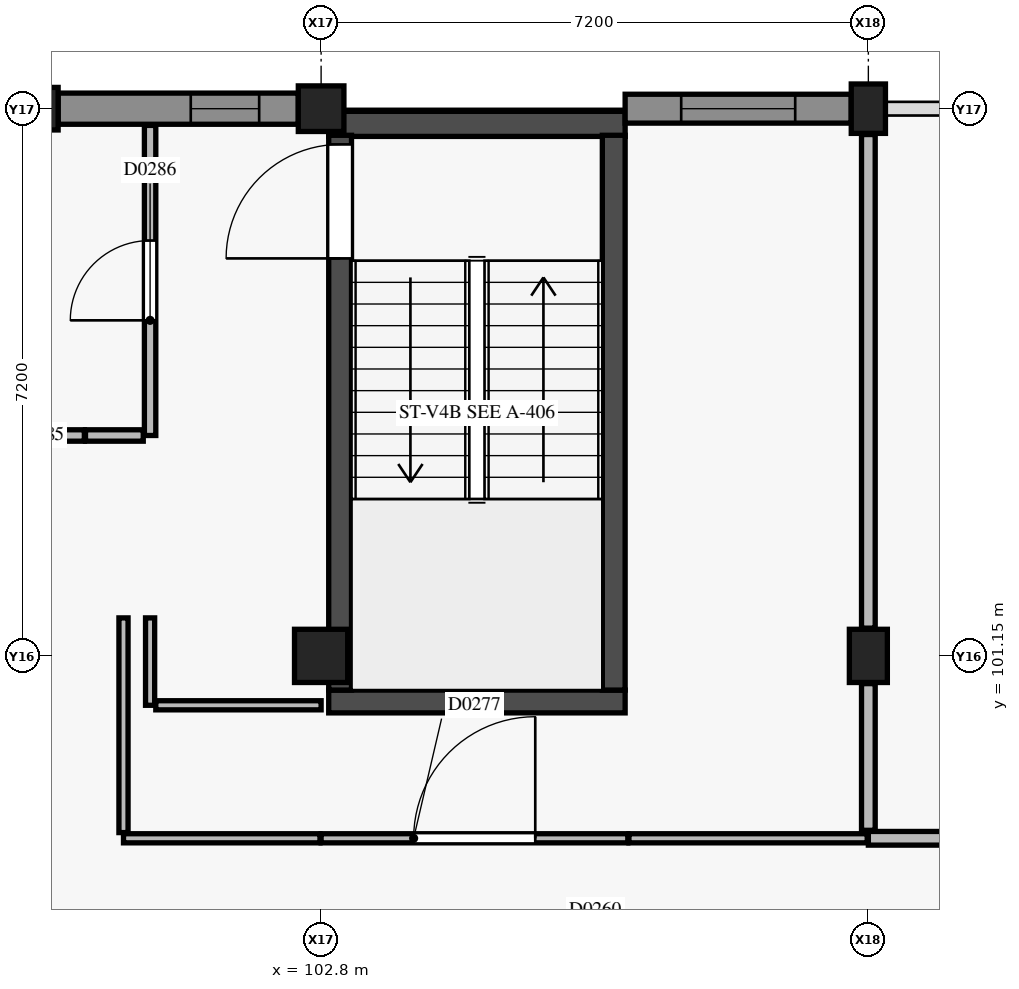
"""IFC4 building model, lengths in metres.
Left out: names, types, materials, properties, quantities, classifications, styles, units other than length and angle.
Written with IfcOpenShell. Run it as: python <this file> out.ifc"""

import sys

from ifc_helpers import new_model, si_unit, direction, frame, frame_2d, origin, origin_2d, place, context, subcontext, project, spatial, rectangle, circle, extrude, element, fill, save


model = new_model("IFC4")
c1 = context("Model", 3, precision=1e-05, world=origin(), true_north=direction((0.0, 1.0)))
c2 = subcontext(c1, "Body", "Model", "MODEL_VIEW")
j1 = project(units=[si_unit("LENGTHUNIT", "METRE"), si_unit("PLANEANGLEUNIT", "RADIAN")], contexts=[c1])
p1 = place(None, origin())
s1 = spatial("IfcSite", under=j1, at=p1, CompositionType="ELEMENT")
p2 = place(p1, origin())
s2 = spatial("IfcBuilding", under=s1, at=p2, CompositionType="ELEMENT")
p3 = place(p2, frame((0.0, 0.0, 13.2)))
s3 = spatial("IfcBuildingStorey", under=s2, at=p3, CompositionType="ELEMENT", Elevation=13.2)
p4 = place(p3, frame((102.8, 101.15, 0.0), z_axis=(0.0, 0.0, 1.0), x_axis=(1.0, 0.0, 0.0)))
e1 = element("IfcColumn", 1, at=p4, inside=s3, PredefinedType="COLUMN", context=c2, shape_type="SweptSolid", body=[
    extrude(rectangle(XDim=0.7, YDim=0.7, at=origin_2d()), origin(), (0.0, 0.0, 1.0), 4.2),
])
p5 = place(p3, frame((102.8, 108.35, 0.0), z_axis=(0.0, 0.0, 1.0), x_axis=(1.0, 0.0, 0.0)))
e2 = element("IfcColumn", 2, at=p5, inside=s3, PredefinedType="COLUMN", context=c2, shape_type="SweptSolid", body=[
    extrude(circle(Radius=0.3, at=origin_2d()), origin(), (0.0, 0.0, 1.0), 4.2),
])
p6 = place(p3, frame((110.0, 101.15, 0.0), z_axis=(0.0, 0.0, 1.0), x_axis=(1.0, 0.0, 0.0)))
e3 = element("IfcColumn", 3, at=p6, inside=s3, PredefinedType="COLUMN", context=c2, shape_type="SweptSolid", body=[
    extrude(rectangle(XDim=0.5, YDim=0.7, at=origin_2d()), origin(), (0.0, 0.0, 1.0), 4.2),
])
p7 = place(p3, frame((110.0, 108.35, 0.0), z_axis=(0.0, 0.0, 1.0), x_axis=(1.0, 0.0, 0.0)))
e4 = element("IfcColumn", 4, at=p7, inside=s3, PredefinedType="COLUMN", context=c2, shape_type="SweptSolid", body=[
    extrude(rectangle(XDim=0.45, YDim=0.65, at=origin_2d()), origin(), (0.0, 0.0, 1.0), 4.2),
])
p8 = place(p3, frame((99.2, 108.35, 0.0), z_axis=(0.0, 0.0, 1.0), x_axis=(1.0, 0.0, 0.0)))
e5 = element("IfcColumn", 5, at=p8, inside=s3, PredefinedType="PILASTER", context=c2, shape_type="SweptSolid", body=[
    extrude(rectangle(XDim=0.28, YDim=0.56, at=origin_2d()), origin(), (0.0, 0.0, 1.0), 4.2),
])
p9 = place(p3, frame((102.9, 100.55, 0.0), z_axis=(0.0, 0.0, 1.0), x_axis=(1.0, 0.0, 0.0)))
e6 = element("IfcWall", 6, at=p9, inside=s3, PredefinedType="SHEAR", context=c2, shape_type="SweptSolid", body=[
    extrude(rectangle(XDim=3.9, YDim=0.3, at=frame_2d((1.95, 0.0))), origin(), (0.0, 0.0, 1.0), 3.95),
])
p10 = place(p3, frame((102.9, 108.15, 0.0), z_axis=(0.0, 0.0, 1.0), x_axis=(1.0, 0.0, 0.0)))
e7 = element("IfcWall", 7, at=p10, inside=s3, PredefinedType="SHEAR", context=c2, shape_type="SweptSolid", body=[
    extrude(rectangle(XDim=3.9, YDim=0.33, at=frame_2d((1.95, 0.0))), origin(), (0.0, 0.0, 1.0), 3.95),
])
p11 = place(p3, frame((103.05, 100.7, 0.0), z_axis=(0.0, 0.0, 1.0), x_axis=(0.0, 1.0, 0.0)))
e8 = element("IfcWall", 8, at=p11, inside=s3, PredefinedType="SHEAR", context=c2, shape_type="SweptSolid", body=[
    extrude(rectangle(XDim=7.3, YDim=0.3, at=frame_2d((3.65, 0.0))), origin(), (0.0, 0.0, 1.0), 3.95),
])
p12 = place(p11, frame((5.68, 0.0, 0.0)))
e9 = element("IfcOpeningElement", 9, at=p12, cuts=e8, PredefinedType="OPENING", context=c2, shape_type="SweptSolid", body=[
    extrude(rectangle(XDim=1.5, YDim=2.15, at=frame_2d((0.75, 1.075))), frame((0.0, 0.16, 0.0), z_axis=(0.0, -1.0, 0.0), x_axis=(1.0, 0.0, 0.0)), (0.0, 0.0, 1.0), 0.32),
])
p13 = place(p3, frame((106.65, 100.7, 0.0), z_axis=(0.0, 0.0, 1.0), x_axis=(0.0, 1.0, 0.0)))
e10 = element("IfcWall", 10, at=p13, inside=s3, PredefinedType="SHEAR", context=c2, shape_type="SweptSolid", body=[
    extrude(rectangle(XDim=7.3, YDim=0.3, at=frame_2d((3.65, 0.0))), origin(), (0.0, 0.0, 1.0), 3.95),
])
p14 = place(p3, frame((99.34, 108.35, 0.0), z_axis=(0.0, 0.0, 1.0), x_axis=(1.0, 0.0, 0.0)))
e11 = element("IfcWall", 11, at=p14, inside=s3, PredefinedType="USERDEFINED", context=c2, shape_type="SweptSolid", body=[
    extrude(rectangle(XDim=3.16, YDim=0.41, at=frame_2d((1.58, 0.0))), origin(), (0.0, 0.0, 1.0), 3.13),
])
p15 = place(p14, frame((1.745, 0.0, 0.95)))
e12 = element("IfcOpeningElement", 12, at=p15, cuts=e11, PredefinedType="OPENING", context=c2, shape_type="SweptSolid", body=[
    extrude(rectangle(XDim=0.9, YDim=1.2, at=frame_2d((0.45, 0.6))), frame((0.0, 0.215, 0.0), z_axis=(0.0, -1.0, 0.0), x_axis=(1.0, 0.0, 0.0)), (0.0, 0.0, 1.0), 0.43),
])
p16 = place(p3, frame((106.8, 108.35, 0.0), z_axis=(0.0, 0.0, 1.0), x_axis=(1.0, 0.0, 0.0)))
e13 = element("IfcWall", 13, at=p16, inside=s3, PredefinedType="USERDEFINED", context=c2, shape_type="SweptSolid", body=[
    extrude(rectangle(XDim=2.975, YDim=0.38, at=frame_2d((1.487, 0.0))), origin(), (0.0, 0.0, 1.0), 3.13),
])
p17 = place(p16, frame((0.738, 0.0, 0.9)))
e14 = element("IfcOpeningElement", 14, at=p17, cuts=e13, PredefinedType="OPENING", context=c2, shape_type="SweptSolid", body=[
    extrude(rectangle(XDim=1.5, YDim=1.5, at=frame_2d((0.75, 0.75))), frame((0.0, 0.2, 0.0), z_axis=(0.0, -1.0, 0.0), x_axis=(1.0, 0.0, 0.0)), (0.0, 0.0, 1.0), 0.4),
])
p18 = place(p3, frame((110.0, 98.75, 0.0), z_axis=(0.0, 0.0, 1.0), x_axis=(1.0, 0.0, 0.0)))
e15 = element("IfcWall", 15, at=p18, inside=s3, PredefinedType="PLUMBINGWALL", context=c2, shape_type="SweptSolid", body=[
    extrude(rectangle(XDim=2.4, YDim=0.18, at=frame_2d((1.2, 0.0))), origin(), (0.0, 0.0, 1.0), 3.355),
])
p19 = place(p3, frame((100.55, 104.05, 0.0), z_axis=(0.0, 0.0, 1.0), x_axis=(0.0, 1.0, 0.0)))
e16 = element("IfcWall", 16, at=p19, inside=s3, PredefinedType="PARTITIONING", context=c2, shape_type="SweptSolid", body=[
    extrude(rectangle(XDim=4.08, YDim=0.15, at=frame_2d((2.04, 0.0))), origin(), (0.0, 0.0, 1.0), 3.515),
])
p20 = place(p19, frame((1.515, 0.0, 0.0)))
e17 = element("IfcOpeningElement", 17, at=p20, cuts=e16, PredefinedType="OPENING", context=c2, shape_type="SweptSolid", body=[
    extrude(rectangle(XDim=1.05, YDim=2.15, at=frame_2d((0.525, 1.075))), frame((0.0, 0.085, 0.0), z_axis=(0.0, -1.0, 0.0), x_axis=(1.0, 0.0, 0.0)), (0.0, 0.0, 1.0), 0.17),
])
p21 = place(p3, frame((99.7, 104.05, 0.0), z_axis=(0.0, 0.0, 1.0), x_axis=(1.0, 0.0, 0.0)))
e18 = element("IfcWall", 18, at=p21, inside=s3, PredefinedType="PARTITIONING", context=c2, shape_type="SweptSolid", body=[
    extrude(rectangle(XDim=0.76, YDim=0.15, at=frame_2d((0.38, 0.0))), origin(), (0.0, 0.0, 1.0), 3.95),
])
p22 = place(p3, frame((98.715, 104.05, 0.0), z_axis=(0.0, 0.0, 1.0), x_axis=(1.0, 0.0, 0.0)))
e19 = element("IfcWall", 19, at=p22, inside=s3, PredefinedType="PARTITIONING", context=c2, shape_type="SweptSolid", body=[
    extrude(rectangle(XDim=0.97, YDim=0.15, at=frame_2d((0.485, 0.0))), origin(), (0.0, 0.0, 1.0), 3.95),
])
p23 = place(p3, frame((100.55, 100.5, 0.0), z_axis=(0.0, 0.0, 1.0), x_axis=(0.0, 1.0, 0.0)))
e20 = element("IfcWall", 20, at=p23, inside=s3, PredefinedType="PARTITIONING", context=c2, shape_type="SweptSolid", body=[
    extrude(rectangle(XDim=1.15, YDim=0.12, at=frame_2d((0.575, 0.0))), origin(), (0.0, 0.0, 1.0), 3.355),
])
p24 = place(p3, frame((100.625, 100.5, 0.0), z_axis=(0.0, 0.0, 1.0), x_axis=(1.0, 0.0, 0.0)))
e21 = element("IfcWall", 21, at=p24, inside=s3, PredefinedType="PARTITIONING", context=c2, shape_type="SweptSolid", body=[
    extrude(rectangle(XDim=2.175, YDim=0.12, at=frame_2d((1.087, 0.0))), origin(), (0.0, 0.0, 1.0), 3.355),
])
p25 = place(p3, frame((106.85, 98.75, 0.0), z_axis=(0.0, 0.0, 1.0), x_axis=(1.0, 0.0, 0.0)))
e22 = element("IfcWall", 22, at=p25, inside=s3, PredefinedType="PARTITIONING", context=c2, shape_type="SweptSolid", body=[
    extrude(rectangle(XDim=3.135, YDim=0.12, at=frame_2d((1.567, 0.0))), origin(), (0.0, 0.0, 1.0), 3.355),
])
p26 = place(p3, frame((102.8, 98.75, 0.0), z_axis=(0.0, 0.0, 1.0), x_axis=(1.0, 0.0, 0.0)))
e23 = element("IfcWall", 23, at=p26, inside=s3, PredefinedType="PARTITIONING", context=c2, shape_type="SweptSolid", body=[
    extrude(rectangle(XDim=4.035, YDim=0.12, at=frame_2d((2.018, 0.0))), origin(), (0.0, 0.0, 1.0), 3.355),
])
p27 = place(p26, frame((1.218, 0.0, 0.0)))
e24 = element("IfcOpeningElement", 24, at=p27, cuts=e23, PredefinedType="OPENING", context=c2, shape_type="SweptSolid", body=[
    extrude(rectangle(XDim=1.6, YDim=2.25, at=frame_2d((0.8, 1.125))), frame((0.0, 0.07, 0.0), z_axis=(0.0, -1.0, 0.0), x_axis=(1.0, 0.0, 0.0)), (0.0, 0.0, 1.0), 0.14),
])
p28 = place(p3, frame((100.2, 98.75, 0.0), z_axis=(0.0, 0.0, 1.0), x_axis=(1.0, 0.0, 0.0)))
e25 = element("IfcWall", 25, at=p28, inside=s3, PredefinedType="PARTITIONING", context=c2, shape_type="SweptSolid", body=[
    extrude(rectangle(XDim=2.585, YDim=0.12, at=frame_2d((1.292, 0.0))), origin(), (0.0, 0.0, 1.0), 3.355),
])
p29 = place(p3, frame((100.2, 98.825, 0.0), z_axis=(0.0, 0.0, 1.0), x_axis=(0.0, 1.0, 0.0)))
e26 = element("IfcWall", 26, at=p29, inside=s3, PredefinedType="PARTITIONING", context=c2, shape_type="SweptSolid", body=[
    extrude(rectangle(XDim=2.825, YDim=0.12, at=frame_2d((1.413, 0.0))), origin(), (0.0, 0.0, 1.0), 3.355),
])
p30 = place(p3, frame((110.0, 98.855, 0.0), z_axis=(0.0, 0.0, 1.0), x_axis=(0.0, 1.0, 0.0)))
e27 = element("IfcWall", 27, at=p30, inside=s3, PredefinedType="PLUMBINGWALL", context=c2, shape_type="SweptSolid", body=[
    extrude(rectangle(XDim=1.93, YDim=0.18, at=frame_2d((0.965, 0.0))), origin(), (0.0, 0.0, 1.0), 3.355),
])
p31 = place(p3, frame((110.0, 101.515, 0.0), z_axis=(0.0, 0.0, 1.0), x_axis=(0.0, 1.0, 0.0)))
e28 = element("IfcWall", 28, at=p31, inside=s3, PredefinedType="PLUMBINGWALL", context=c2, shape_type="SweptSolid", body=[
    extrude(rectangle(XDim=6.495, YDim=0.18, at=frame_2d((3.248, 0.0))), origin(), (0.0, 0.0, 1.0), 3.385),
])
p32 = place(p15, origin())
e29 = element("IfcWindow", 29, at=p32, inside=s3, PartitioningType="SINGLE_PANEL", PredefinedType="WINDOW", context=c2, shape_type="SweptSolid", body=[
    extrude(rectangle(XDim=0.9, YDim=1.2, at=frame_2d((0.45, 0.6))), frame((0.0, 0.03, 0.0), z_axis=(0.0, -1.0, 0.0), x_axis=(1.0, 0.0, 0.0)), (0.0, 0.0, 1.0), 0.06),
])
fill(e12, e29)
p33 = place(p17, origin())
e30 = element("IfcWindow", 30, at=p33, inside=s3, PartitioningType="SINGLE_PANEL", PredefinedType="WINDOW", context=c2, shape_type="SweptSolid", body=[
    extrude(rectangle(XDim=1.5, YDim=1.5, at=frame_2d((0.75, 0.75))), frame((0.0, 0.03, 0.0), z_axis=(0.0, -1.0, 0.0), x_axis=(1.0, 0.0, 0.0)), (0.0, 0.0, 1.0), 0.06),
])
fill(e14, e30)
p34 = place(p12, origin())
e31 = element("IfcDoor", 31, at=p34, inside=s3, OperationType="SINGLE_SWING_LEFT", PredefinedType="DOOR", context=c2, shape_type="SweptSolid", body=[
    extrude(rectangle(XDim=1.5, YDim=2.15, at=frame_2d((0.75, 1.075))), frame((0.0, 0.025, 0.0), z_axis=(0.0, -1.0, 0.0), x_axis=(1.0, 0.0, 0.0)), (0.0, 0.0, 1.0), 0.05),
])
fill(e9, e31)
p35 = place(p27, origin())
e32 = element("IfcDoor", 32, at=p35, inside=s3, OperationType="SINGLE_SWING_RIGHT", PredefinedType="DOOR", context=c2, shape_type="SweptSolid", body=[
    extrude(rectangle(XDim=1.6, YDim=2.25, at=frame_2d((0.8, 1.125))), frame((0.0, 0.025, 0.0), z_axis=(0.0, -1.0, 0.0), x_axis=(1.0, 0.0, 0.0)), (0.0, 0.0, 1.0), 0.05),
])
fill(e24, e32)
p36 = place(p20, origin())
e33 = element("IfcDoor", 33, at=p36, inside=s3, OperationType="SINGLE_SWING_LEFT", PredefinedType="DOOR", context=c2, shape_type="SweptSolid", body=[
    extrude(rectangle(XDim=1.05, YDim=2.15, at=frame_2d((0.525, 1.075))), frame((0.0, 0.025, 0.0), z_axis=(0.0, -1.0, 0.0), x_axis=(1.0, 0.0, 0.0)), (0.0, 0.0, 1.0), 0.05),
])
fill(e17, e33)
save(model, sys.argv[1])
